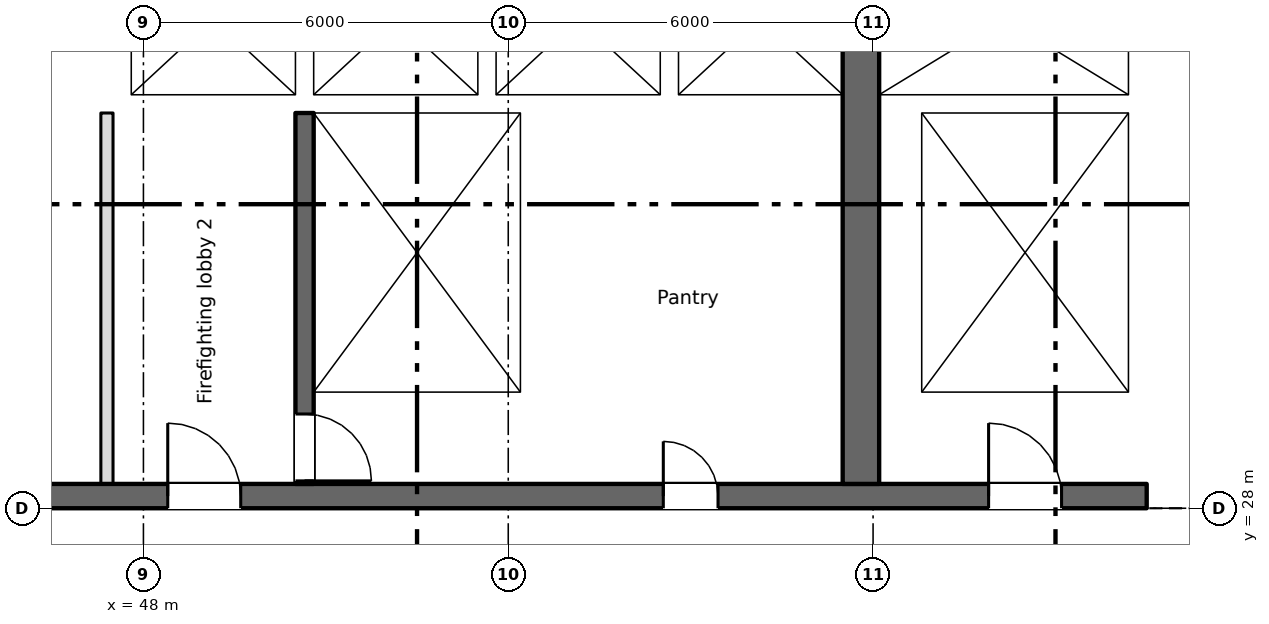
"""IFC4 building model, lengths in metres.
Left out: names, types, materials, properties, quantities, classifications, styles, units other than length and angle.
Written with IfcOpenShell. Run it as: python <this file> out.ifc"""

import sys

from ifc_helpers import new_model, si_unit, direction, frame, frame_2d, origin, place, context, subcontext, project, spatial, rectangle, extrude, element, fill, save


model = new_model("IFC4")
c1 = context("Model", 3, precision=1e-05, world=origin(), true_north=direction((0.0, 1.0)))
c2 = subcontext(c1, "Body", "Model", "MODEL_VIEW")
j1 = project(units=[si_unit("LENGTHUNIT", "METRE"), si_unit("PLANEANGLEUNIT", "RADIAN")], contexts=[c1])
p1 = place(None, origin())
s1 = spatial("IfcSite", under=j1, at=p1, CompositionType="ELEMENT")
p2 = place(p1, origin())
s2 = spatial("IfcBuilding", under=s1, at=p2, CompositionType="ELEMENT")
p3 = place(p2, frame((0.0, 0.0, 250.75)))
s3 = spatial("IfcBuildingStorey", under=s2, at=p3, CompositionType="ELEMENT", Elevation=250.75)
p4 = place(p3, frame((6.5, 28.2, 0.0), z_axis=(0.0, 0.0, 1.0), x_axis=(1.0, 0.0, 0.0)))
e1 = element("IfcWall", 1, at=p4, inside=s3, PredefinedType="SHEAR", context=c2, shape_type="SweptSolid", body=[
    extrude(rectangle(XDim=58.0, YDim=0.4, at=frame_2d((29.0, 0.0))), origin(), (0.0, 0.0, 1.0), 3.4),
])
p5 = place(p4, frame((12.762, 0.0, 0.0)))
e2 = element("IfcOpeningElement", 2, at=p5, cuts=e1, PredefinedType="OPENING", context=c2, shape_type="SweptSolid", body=[
    extrude(rectangle(XDim=0.9, YDim=2.1, at=frame_2d((0.45, 1.05))), frame((0.0, 0.21, 0.0), z_axis=(0.0, -1.0, 0.0), x_axis=(1.0, 0.0, 0.0)), (0.0, 0.0, 1.0), 0.42),
])
p6 = place(p4, frame((15.337, 0.0, 0.0)))
e3 = element("IfcOpeningElement", 3, at=p6, cuts=e1, PredefinedType="OPENING", context=c2, shape_type="SweptSolid", body=[
    extrude(rectangle(XDim=0.9, YDim=2.1, at=frame_2d((0.45, 1.05))), frame((0.0, 0.21, 0.0), z_axis=(0.0, -1.0, 0.0), x_axis=(1.0, 0.0, 0.0)), (0.0, 0.0, 1.0), 0.42),
])
p7 = place(p4, frame((50.05, 0.0, 0.0)))
e4 = element("IfcOpeningElement", 4, at=p7, cuts=e1, PredefinedType="OPENING", context=c2, shape_type="SweptSolid", body=[
    extrude(rectangle(XDim=0.9, YDim=2.1, at=frame_2d((0.45, 1.05))), frame((0.0, 0.21, 0.0), z_axis=(0.0, -1.0, 0.0), x_axis=(1.0, 0.0, 0.0)), (0.0, 0.0, 1.0), 0.42),
])
p8 = place(p4, frame((0.762, 0.0, 0.0)))
e5 = element("IfcOpeningElement", 5, at=p8, cuts=e1, PredefinedType="OPENING", context=c2, shape_type="SweptSolid", body=[
    extrude(rectangle(XDim=0.9, YDim=2.1, at=frame_2d((0.45, 1.05))), frame((0.0, 0.21, 0.0), z_axis=(0.0, -1.0, 0.0), x_axis=(1.0, 0.0, 0.0)), (0.0, 0.0, 1.0), 0.42),
])
p9 = place(p4, frame((2.337, 0.0, 0.0)))
e6 = element("IfcOpeningElement", 6, at=p9, cuts=e1, PredefinedType="OPENING", context=c2, shape_type="SweptSolid", body=[
    extrude(rectangle(XDim=0.9, YDim=2.1, at=frame_2d((0.45, 1.05))), frame((0.0, 0.21, 0.0), z_axis=(0.0, -1.0, 0.0), x_axis=(1.0, 0.0, 0.0)), (0.0, 0.0, 1.0), 0.42),
])
p10 = place(p4, frame((4.9, 0.0, 0.0)))
e7 = element("IfcOpeningElement", 7, at=p10, cuts=e1, PredefinedType="OPENING", context=c2, shape_type="SweptSolid", body=[
    extrude(rectangle(XDim=1.2, YDim=2.1, at=frame_2d((0.6, 1.05))), frame((0.0, 0.21, 0.0), z_axis=(0.0, -1.0, 0.0), x_axis=(1.0, 0.0, 0.0)), (0.0, 0.0, 1.0), 0.42),
])
p11 = place(p4, frame((31.9, 0.0, 0.0)))
e8 = element("IfcOpeningElement", 8, at=p11, cuts=e1, PredefinedType="OPENING", context=c2, shape_type="SweptSolid", body=[
    extrude(rectangle(XDim=1.2, YDim=2.1, at=frame_2d((0.6, 1.05))), frame((0.0, 0.21, 0.0), z_axis=(0.0, -1.0, 0.0), x_axis=(1.0, 0.0, 0.0)), (0.0, 0.0, 1.0), 0.42),
])
p12 = place(p4, frame((55.4, 0.0, 0.0)))
e9 = element("IfcOpeningElement", 9, at=p12, cuts=e1, PredefinedType="OPENING", context=c2, shape_type="SweptSolid", body=[
    extrude(rectangle(XDim=1.2, YDim=2.1, at=frame_2d((0.6, 1.05))), frame((0.0, 0.21, 0.0), z_axis=(0.0, -1.0, 0.0), x_axis=(1.0, 0.0, 0.0)), (0.0, 0.0, 1.0), 0.42),
])
p13 = place(p4, frame((21.9, 0.0, 0.0)))
e10 = element("IfcOpeningElement", 10, at=p13, cuts=e1, PredefinedType="OPENING", context=c2, shape_type="SweptSolid", body=[
    extrude(rectangle(XDim=1.2, YDim=2.1, at=frame_2d((0.6, 1.05))), frame((0.0, 0.21, 0.0), z_axis=(0.0, -1.0, 0.0), x_axis=(1.0, 0.0, 0.0)), (0.0, 0.0, 1.0), 0.42),
])
p14 = place(p4, frame((41.9, 0.0, 0.0)))
e11 = element("IfcOpeningElement", 11, at=p14, cuts=e1, PredefinedType="OPENING", context=c2, shape_type="SweptSolid", body=[
    extrude(rectangle(XDim=1.2, YDim=2.1, at=frame_2d((0.6, 1.05))), frame((0.0, 0.21, 0.0), z_axis=(0.0, -1.0, 0.0), x_axis=(1.0, 0.0, 0.0)), (0.0, 0.0, 1.0), 0.42),
])
p15 = place(p4, frame((25.05, 0.0, 0.0)))
e12 = element("IfcOpeningElement", 12, at=p15, cuts=e1, PredefinedType="OPENING", context=c2, shape_type="SweptSolid", body=[
    extrude(rectangle(XDim=2.4, YDim=2.1, at=frame_2d((1.2, 1.05))), frame((0.0, 0.21, 0.0), z_axis=(0.0, -1.0, 0.0), x_axis=(1.0, 0.0, 0.0)), (0.0, 0.0, 1.0), 0.42),
])
p16 = place(p4, frame((37.55, 0.0, 0.0)))
e13 = element("IfcOpeningElement", 13, at=p16, cuts=e1, PredefinedType="OPENING", context=c2, shape_type="SweptSolid", body=[
    extrude(rectangle(XDim=2.4, YDim=2.1, at=frame_2d((1.2, 1.05))), frame((0.0, 0.21, 0.0), z_axis=(0.0, -1.0, 0.0), x_axis=(1.0, 0.0, 0.0)), (0.0, 0.0, 1.0), 0.42),
])
p17 = place(p4, frame((8.25, 0.0, 0.0)))
e14 = element("IfcOpeningElement", 14, at=p17, cuts=e1, PredefinedType="OPENING", context=c2, shape_type="SweptSolid", body=[
    extrude(rectangle(XDim=2.4, YDim=2.1, at=frame_2d((1.2, 1.05))), frame((0.0, 0.21, 0.0), z_axis=(0.0, -1.0, 0.0), x_axis=(1.0, 0.0, 0.0)), (0.0, 0.0, 1.0), 0.42),
])
p18 = place(p4, frame((29.05, 0.0, 0.0)))
e15 = element("IfcOpeningElement", 15, at=p18, cuts=e1, PredefinedType="OPENING", context=c2, shape_type="SweptSolid", body=[
    extrude(rectangle(XDim=0.9, YDim=2.1, at=frame_2d((0.45, 1.05))), frame((0.0, 0.21, 0.0), z_axis=(0.0, -1.0, 0.0), x_axis=(1.0, 0.0, 0.0)), (0.0, 0.0, 1.0), 0.42),
])
p19 = place(p4, frame((35.05, 0.0, 0.0)))
e16 = element("IfcOpeningElement", 16, at=p19, cuts=e1, PredefinedType="OPENING", context=c2, shape_type="SweptSolid", body=[
    extrude(rectangle(XDim=0.9, YDim=2.1, at=frame_2d((0.45, 1.05))), frame((0.0, 0.21, 0.0), z_axis=(0.0, -1.0, 0.0), x_axis=(1.0, 0.0, 0.0)), (0.0, 0.0, 1.0), 0.42),
])
p20 = place(p3, frame((64.35, 34.8, 0.0), z_axis=(0.0, 0.0, 1.0), x_axis=(0.0, 1.0, 0.0)))
e17 = element("IfcWall", 17, at=p20, inside=s3, PredefinedType="SHEAR", context=c2, shape_type="SweptSolid", body=[
    extrude(rectangle(XDim=6.45, YDim=0.3, at=frame_2d((3.225, 0.0))), origin(), (0.0, 0.0, 1.0), 3.4),
])
p21 = place(p3, frame((59.8, 28.4, 0.0), z_axis=(0.0, 0.0, 1.0), x_axis=(0.0, 1.0, 0.0)))
e18 = element("IfcWall", 18, at=p21, inside=s3, PredefinedType="SHEAR", context=c2, shape_type="SweptSolid", body=[
    extrude(rectangle(XDim=15.1, YDim=0.6, at=frame_2d((7.55, 0.0))), origin(), (0.0, 0.0, 1.0), 3.4),
])
p22 = place(p21, frame((9.6, 0.0, 0.0)))
e19 = element("IfcOpeningElement", 19, at=p22, cuts=e18, PredefinedType="OPENING", context=c2, shape_type="SweptSolid", body=[
    extrude(rectangle(XDim=2.0, YDim=2.1, at=frame_2d((1.0, 1.05))), frame((0.0, 0.31, 0.0), z_axis=(0.0, -1.0, 0.0), x_axis=(1.0, 0.0, 0.0)), (0.0, 0.0, 1.0), 0.62),
])
p23 = place(p3, frame((50.65, 34.5, 0.0), z_axis=(0.0, 0.0, 1.0), x_axis=(0.0, -1.0, 0.0)))
e20 = element("IfcWall", 20, at=p23, inside=s3, PredefinedType="SHEAR", context=c2, shape_type="SweptSolid", body=[
    extrude(rectangle(XDim=6.1, YDim=0.3, at=frame_2d((3.05, 0.0))), origin(), (0.0, 0.0, 1.0), 3.4),
])
p24 = place(p23, frame((4.95, 0.0, 0.0)))
e21 = element("IfcOpeningElement", 21, at=p24, cuts=e20, PredefinedType="OPENING", context=c2, shape_type="SweptSolid", body=[
    extrude(rectangle(XDim=1.1, YDim=2.1, at=frame_2d((0.55, 1.05))), frame((0.0, 0.16, 0.0), z_axis=(0.0, -1.0, 0.0), x_axis=(1.0, 0.0, 0.0)), (0.0, 0.0, 1.0), 0.32),
])
p25 = place(p3, frame((54.35, 28.4, 0.0), z_axis=(0.0, 0.0, 1.0), x_axis=(0.0, 1.0, 0.0)))
e22 = element("IfcWall", 22, at=p25, inside=s3, PredefinedType="SHEAR", context=c2, shape_type="SweptSolid", body=[
    extrude(rectangle(XDim=6.1, YDim=0.3, at=frame_2d((3.05, 0.0))), origin(), (0.0, 0.0, 1.0), 3.4),
])
p26 = place(p3, frame((60.45, 28.4, 0.0), z_axis=(0.0, 0.0, 1.0), x_axis=(0.0, 1.0, 0.0)))
e23 = element("IfcWall", 23, at=p26, inside=s3, PredefinedType="SHEAR", context=c2, shape_type="SweptSolid", body=[
    extrude(rectangle(XDim=6.1, YDim=0.7, at=frame_2d((3.05, 0.0))), origin(), (0.0, 0.0, 1.0), 3.4),
])
p27 = place(p3, frame((64.35, 28.4, 0.0), z_axis=(0.0, 0.0, 1.0), x_axis=(0.0, 1.0, 0.0)))
e24 = element("IfcWall", 24, at=p27, inside=s3, PredefinedType="SHEAR", context=c2, shape_type="SweptSolid", body=[
    extrude(rectangle(XDim=6.1, YDim=0.3, at=frame_2d((3.05, 0.0))), origin(), (0.0, 0.0, 1.0), 3.4),
])
p28 = place(p3, frame((47.3, 34.65, 0.0), z_axis=(0.0, 0.0, 1.0), x_axis=(1.0, 0.0, 0.0)))
e25 = element("IfcWall", 25, at=p28, inside=s3, PredefinedType="SHEAR", context=c2, shape_type="SweptSolid", body=[
    extrude(rectangle(XDim=12.2, YDim=0.3, at=frame_2d((6.1, 0.0))), origin(), (0.0, 0.0, 1.0), 3.4),
])
p29 = place(p28, frame((1.3, 0.0, 0.0)))
e26 = element("IfcOpeningElement", 26, at=p29, cuts=e25, PredefinedType="OPENING", context=c2, shape_type="SweptSolid", body=[
    extrude(rectangle(XDim=1.1, YDim=2.1, at=frame_2d((0.55, 1.05))), frame((0.0, 0.16, 0.0), z_axis=(0.0, -1.0, 0.0), x_axis=(1.0, 0.0, 0.0)), (0.0, 0.0, 1.0), 0.32),
])
p30 = place(p3, frame((60.1, 34.65, 0.0), z_axis=(0.0, 0.0, 1.0), x_axis=(1.0, 0.0, 0.0)))
e27 = element("IfcWall", 27, at=p30, inside=s3, PredefinedType="SHEAR", context=c2, shape_type="SweptSolid", body=[
    extrude(rectangle(XDim=4.4, YDim=0.3, at=frame_2d((2.2, 0.0))), origin(), (0.0, 0.0, 1.0), 3.4),
])
p31 = place(p3, frame((47.55, 34.8, 0.0), z_axis=(0.0, 0.0, 1.0), x_axis=(0.0, 1.0, 0.0)))
e28 = element("IfcWall", 28, at=p31, inside=s3, PredefinedType="SHEAR", context=c2, shape_type="SweptSolid", body=[
    extrude(rectangle(XDim=2.5, YDim=0.5, at=frame_2d((1.25, 0.0))), origin(), (0.0, 0.0, 1.0), 3.4),
])
for number, where, z_axis, x_axis in (
    (29, (50.65, 34.8, 0.0), (0.0, 0.0, 1.0), (0.0, 1.0, 0.0)),
    (30, (53.65, 34.8, 0.0), (0.0, 0.0, 1.0), (0.0, 1.0, 0.0)),
    (31, (56.65, 34.8, 0.0), (0.0, 0.0, 1.0), (0.0, 1.0, 0.0)),
):
    element("IfcWall", number, at=place(p3, frame(where, z_axis=z_axis, x_axis=x_axis)), inside=s3, PredefinedType="SHEAR", context=c2, shape_type="SweptSolid", body=[
        extrude(rectangle(XDim=2.5, YDim=0.3, at=frame_2d((1.25, 0.0))), origin(), (0.0, 0.0, 1.0), 3.4),
    ])
p32 = place(p3, frame((47.4, 28.4, 0.0), z_axis=(0.0, 0.0, 1.0), x_axis=(0.0, 1.0, 0.0)))
e32 = element("IfcWall", 32, at=p32, inside=s3, PredefinedType="PARTITIONING", context=c2, shape_type="SweptSolid", body=[
    extrude(rectangle(XDim=6.1, YDim=0.2, at=frame_2d((3.05, 0.0))), origin(), (0.0, 0.0, 1.0), 3.4),
])
p33 = place(p7, origin())
e33 = element("IfcDoor", 33, at=p33, inside=s3, OperationType="SINGLE_SWING_LEFT", PredefinedType="DOOR", context=c2, shape_type="SweptSolid", body=[
    extrude(rectangle(XDim=0.9, YDim=2.1, at=frame_2d((0.45, 1.05))), frame((0.0, 0.025, 0.0), z_axis=(0.0, -1.0, 0.0), x_axis=(1.0, 0.0, 0.0)), (0.0, 0.0, 1.0), 0.05),
])
fill(e4, e33)
p34 = place(p29, origin())
e34 = element("IfcDoor", 34, at=p34, inside=s3, OperationType="SLIDING_TO_LEFT", PredefinedType="DOOR", context=c2, shape_type="SweptSolid", body=[
    extrude(rectangle(XDim=1.1, YDim=2.1, at=frame_2d((0.55, 1.05))), frame((0.0, 0.025, 0.0), z_axis=(0.0, -1.0, 0.0), x_axis=(1.0, 0.0, 0.0)), (0.0, 0.0, 1.0), 0.05),
])
fill(e26, e34)
p35 = place(p24, origin())
e35 = element("IfcDoor", 35, at=p35, inside=s3, OperationType="SINGLE_SWING_RIGHT", PredefinedType="DOOR", context=c2, shape_type="SweptSolid", body=[
    extrude(rectangle(XDim=1.1, YDim=2.1, at=frame_2d((0.55, 1.05))), frame((0.0, 0.025, 0.0), z_axis=(0.0, -1.0, 0.0), x_axis=(1.0, 0.0, 0.0)), (0.0, 0.0, 1.0), 0.05),
])
fill(e21, e35)
p36 = place(p12, origin())
e36 = element("IfcDoor", 36, at=p36, inside=s3, OperationType="SINGLE_SWING_LEFT", PredefinedType="DOOR", context=c2, shape_type="SweptSolid", body=[
    extrude(rectangle(XDim=1.2, YDim=2.1, at=frame_2d((0.6, 1.05))), frame((0.0, 0.025, 0.0), z_axis=(0.0, -1.0, 0.0), x_axis=(1.0, 0.0, 0.0)), (0.0, 0.0, 1.0), 0.05),
])
fill(e9, e36)
p37 = place(p14, origin())
e37 = element("IfcDoor", 37, at=p37, inside=s3, OperationType="SINGLE_SWING_LEFT", PredefinedType="DOOR", context=c2, shape_type="SweptSolid", body=[
    extrude(rectangle(XDim=1.2, YDim=2.1, at=frame_2d((0.6, 1.05))), frame((0.0, 0.025, 0.0), z_axis=(0.0, -1.0, 0.0), x_axis=(1.0, 0.0, 0.0)), (0.0, 0.0, 1.0), 0.05),
])
fill(e11, e37)
save(model, sys.argv[1])
